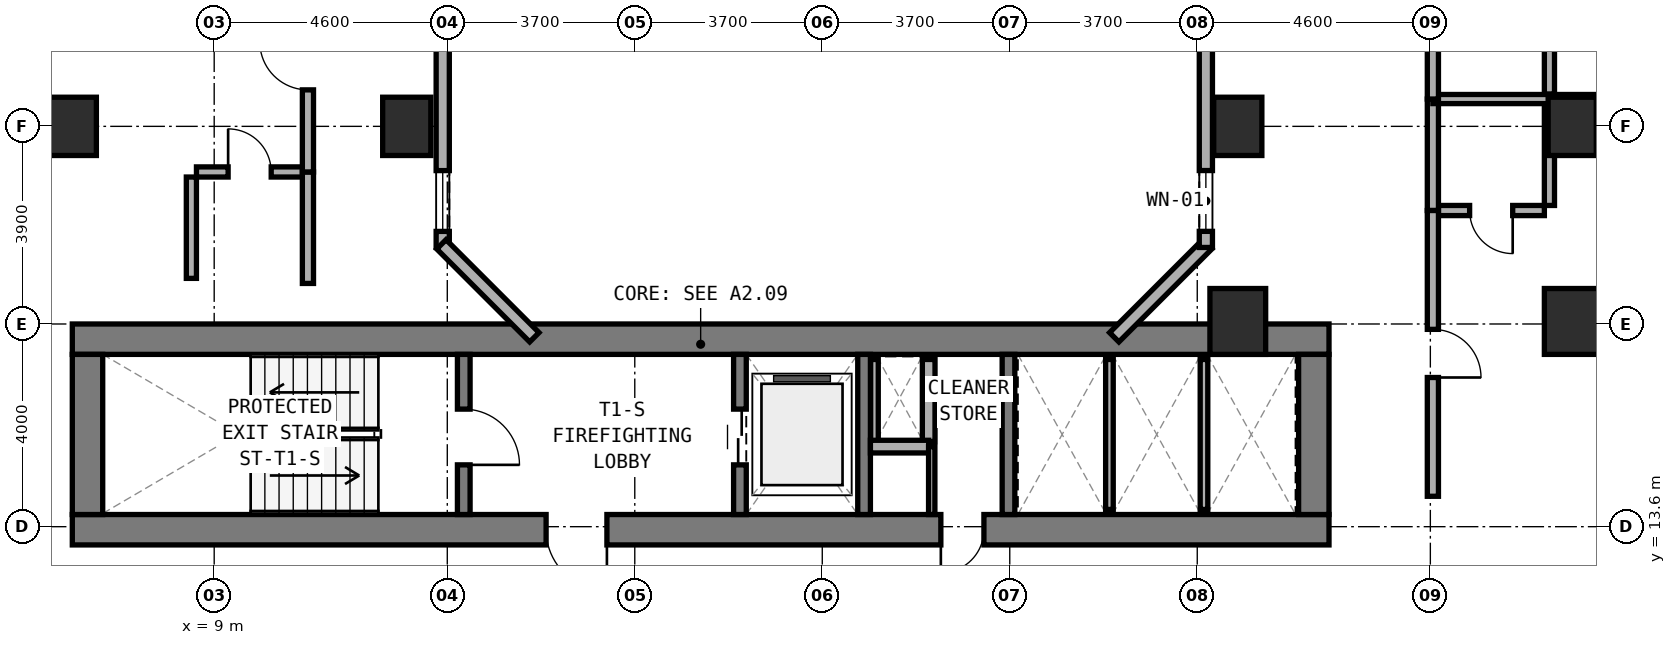
"""IFC4 building model, lengths in metres.
Left out: names, types, materials, properties, quantities, classifications, styles, units other than length and angle.
Written with IfcOpenShell. Run it as: python <this file> out.ifc"""

import sys

from ifc_helpers import new_model, si_unit, direction, frame, frame_2d, origin, origin_2d, place, context, subcontext, project, spatial, rectangle, extrude, element, fill, save


model = new_model("IFC4")
c1 = context("Model", 3, precision=1e-05, world=origin(), true_north=direction((0.0, 1.0)))
c2 = subcontext(c1, "Body", "Model", "MODEL_VIEW")
j1 = project(units=[si_unit("LENGTHUNIT", "METRE"), si_unit("PLANEANGLEUNIT", "RADIAN")], contexts=[c1])
p1 = place(None, origin())
s1 = spatial("IfcSite", under=j1, at=p1, CompositionType="ELEMENT")
p2 = place(p1, origin())
s2 = spatial("IfcBuilding", under=s1, at=p2, CompositionType="ELEMENT")
p3 = place(p2, frame((0.0, 0.0, 27.5)))
s3 = spatial("IfcBuildingStorey", under=s2, at=p3, CompositionType="ELEMENT", Elevation=27.5)
p4 = place(p3, frame((6.2, 13.54, 0.0), z_axis=(0.0, 0.0, 1.0), x_axis=(1.0, 0.0, 0.0)))
e1 = element("IfcWall", 1, at=p4, inside=s3, PredefinedType="SHEAR", context=c2, shape_type="SweptSolid", body=[
    extrude(rectangle(XDim=24.8, YDim=0.6, at=frame_2d((12.4, 0.0))), origin(), (0.0, 0.0, 1.0), 3.5),
])
p5 = place(p4, frame((9.35, 0.0, 0.0)))
e2 = element("IfcOpeningElement", 2, at=p5, cuts=e1, PredefinedType="OPENING", context=c2, shape_type="SweptSolid", body=[
    extrude(rectangle(XDim=1.2, YDim=2.15, at=frame_2d((0.6, 1.075))), frame((0.0, 0.31, 0.0), z_axis=(0.0, -1.0, 0.0), x_axis=(1.0, 0.0, 0.0)), (0.0, 0.0, 1.0), 0.62),
])
p6 = place(p4, frame((17.14, 0.0, 0.0)))
e3 = element("IfcOpeningElement", 3, at=p6, cuts=e1, PredefinedType="OPENING", context=c2, shape_type="SweptSolid", body=[
    extrude(rectangle(XDim=0.85, YDim=2.1, at=frame_2d((0.425, 1.05))), frame((0.0, 0.31, 0.0), z_axis=(0.0, -1.0, 0.0), x_axis=(1.0, 0.0, 0.0)), (0.0, 0.0, 1.0), 0.62),
])
p7 = place(p3, frame((6.2, 17.3, 0.0), z_axis=(0.0, 0.0, 1.0), x_axis=(1.0, 0.0, 0.0)))
e4 = element("IfcWall", 4, at=p7, inside=s3, PredefinedType="SHEAR", context=c2, shape_type="SweptSolid", body=[
    extrude(rectangle(XDim=24.8, YDim=0.6, at=frame_2d((12.4, 0.0))), origin(), (0.0, 0.0, 1.0), 3.5),
])
for number, where, z_axis, x_axis in (
    (5, (6.5, 13.84, 0.0), (0.0, 0.0, 1.0), (0.0, 1.0, 0.0)),
    (6, (30.7, 13.84, 0.0), (0.0, 0.0, 1.0), (0.0, 1.0, 0.0)),
):
    element("IfcWall", number, at=place(p3, frame(where, z_axis=z_axis, x_axis=x_axis)), inside=s3, PredefinedType="SHEAR", context=c2, shape_type="SweptSolid", body=[
        extrude(rectangle(XDim=3.16, YDim=0.6, at=frame_2d((1.58, 0.0))), origin(), (0.0, 0.0, 1.0), 3.5),
    ])
p8 = place(p3, frame((13.925, 13.84, 0.0), z_axis=(0.0, 0.0, 1.0), x_axis=(0.0, 1.0, 0.0)))
e7 = element("IfcWall", 7, at=p8, inside=s3, PredefinedType="STANDARD", context=c2, shape_type="SweptSolid", body=[
    extrude(rectangle(XDim=3.16, YDim=0.25, at=frame_2d((1.58, 0.0))), origin(), (0.0, 0.0, 1.0), 3.22),
])
p9 = place(p8, frame((0.98, 0.0, 0.0)))
e8 = element("IfcOpeningElement", 8, at=p9, cuts=e7, PredefinedType="OPENING", context=c2, shape_type="SweptSolid", body=[
    extrude(rectangle(XDim=1.1, YDim=2.15, at=frame_2d((0.55, 1.075))), frame((0.0, 0.135, 0.0), z_axis=(0.0, -1.0, 0.0), x_axis=(1.0, 0.0, 0.0)), (0.0, 0.0, 1.0), 0.27),
])
p10 = place(p3, frame((19.375, 13.84, 0.0), z_axis=(0.0, 0.0, 1.0), x_axis=(0.0, 1.0, 0.0)))
e9 = element("IfcWall", 9, at=p10, inside=s3, PredefinedType="STANDARD", context=c2, shape_type="SweptSolid", body=[
    extrude(rectangle(XDim=3.16, YDim=0.25, at=frame_2d((1.58, 0.0))), origin(), (0.0, 0.0, 1.0), 3.22),
])
p11 = place(p10, frame((0.98, 0.0, 0.0)))
e10 = element("IfcOpeningElement", 10, at=p11, cuts=e9, PredefinedType="OPENING", context=c2, shape_type="SweptSolid", body=[
    extrude(rectangle(XDim=1.1, YDim=2.15, at=frame_2d((0.55, 1.075))), frame((0.0, 0.135, 0.0), z_axis=(0.0, -1.0, 0.0), x_axis=(1.0, 0.0, 0.0)), (0.0, 0.0, 1.0), 0.27),
])
for number, where, z_axis, x_axis in (
    (11, (21.825, 13.84, 0.0), (0.0, 0.0, 1.0), (0.0, 1.0, 0.0)),
    (12, (24.675, 13.84, 0.0), (0.0, 0.0, 1.0), (0.0, 1.0, 0.0)),
):
    element("IfcWall", number, at=place(p3, frame(where, z_axis=z_axis, x_axis=x_axis)), inside=s3, PredefinedType="STANDARD", context=c2, shape_type="SweptSolid", body=[
        extrude(rectangle(XDim=3.16, YDim=0.25, at=frame_2d((1.58, 0.0))), origin(), (0.0, 0.0, 1.0), 3.22),
    ])
for number, where, z_axis, x_axis in (
    (13, (6.2, 21.5, 0.0), (0.0, 0.0, 1.0), (1.0, 0.0, 0.0)),
    (14, (35.8, 21.5, 0.0), (0.0, 0.0, 1.0), (1.0, 0.0, 0.0)),
):
    element("IfcColumn", number, at=place(p3, frame(where, z_axis=z_axis, x_axis=x_axis)), inside=s3, PredefinedType="COLUMN", context=c2, shape_type="SweptSolid", body=[
        extrude(rectangle(XDim=0.95, YDim=1.15, at=origin_2d()), origin(), (0.0, 0.0, 1.0), 3.5),
    ])
p12 = place(p3, frame((35.8, 17.65, 0.0), z_axis=(0.0, 0.0, 1.0), x_axis=(1.0, 0.0, 0.0)))
e15 = element("IfcColumn", 15, at=p12, inside=s3, PredefinedType="COLUMN", context=c2, shape_type="SweptSolid", body=[
    extrude(rectangle(XDim=1.1, YDim=1.3, at=origin_2d()), origin(), (0.0, 0.0, 1.0), 3.5),
])
p13 = place(p3, frame((12.8, 21.5, 0.0), z_axis=(0.0, 0.0, 1.0), x_axis=(1.0, 0.0, 0.0)))
e16 = element("IfcColumn", 16, at=p13, inside=s3, PredefinedType="COLUMN", context=c2, shape_type="SweptSolid", body=[
    extrude(rectangle(XDim=0.95, YDim=1.15, at=origin_2d()), origin(), (0.0, 0.0, 1.0), 3.5),
])
p14 = place(p3, frame((29.2, 17.65, 0.0), z_axis=(0.0, 0.0, 1.0), x_axis=(1.0, 0.0, 0.0)))
e17 = element("IfcColumn", 17, at=p14, inside=s3, PredefinedType="COLUMN", context=c2, shape_type="SweptSolid", body=[
    extrude(rectangle(XDim=1.1, YDim=1.3, at=origin_2d()), origin(), (0.0, 0.0, 1.0), 3.5),
])
p15 = place(p3, frame((29.2, 21.5, 0.0), z_axis=(0.0, 0.0, 1.0), x_axis=(1.0, 0.0, 0.0)))
e18 = element("IfcColumn", 18, at=p15, inside=s3, PredefinedType="COLUMN", context=c2, shape_type="SweptSolid", body=[
    extrude(rectangle(XDim=0.95, YDim=1.15, at=origin_2d()), origin(), (0.0, 0.0, 1.0), 3.5),
])
p16 = place(p3, frame((26.762, 17.338, 0.0), z_axis=(0.0, 0.0, 1.0), x_axis=(0.707059717605, 0.707153841636, 0.0)))
e19 = element("IfcWall", 19, at=p16, inside=s3, PredefinedType="STANDARD", context=c2, shape_type="SweptSolid", body=[
    extrude(rectangle(XDim=2.594, YDim=0.26, at=frame_2d((1.297, 0.0))), origin(), (0.0, 0.0, 1.0), 3.22),
])
p17 = place(p3, frame((28.57, 19.11, 0.0), z_axis=(0.0, 0.0, 1.0), x_axis=(0.0, 1.0, 0.0)))
e20 = element("IfcWall", 20, at=p17, inside=s3, PredefinedType="STANDARD", context=c2, shape_type="SweptSolid", body=[
    extrude(rectangle(XDim=11.78, YDim=0.26, at=frame_2d((5.89, 0.0))), origin(), (0.0, 0.0, 1.0), 3.22),
])
p18 = place(p17, frame((0.318, 0.0, 0.85)))
e21 = element("IfcOpeningElement", 21, at=p18, cuts=e20, PredefinedType="OPENING", context=c2, shape_type="SweptSolid", body=[
    extrude(rectangle(XDim=1.2, YDim=1.5, at=frame_2d((0.6, 0.75))), frame((0.0, 0.14, 0.0), z_axis=(0.0, -1.0, 0.0), x_axis=(1.0, 0.0, 0.0)), (0.0, 0.0, 1.0), 0.28),
])
p19 = place(p17, frame((4.99, 0.0, 0.85)))
e22 = element("IfcOpeningElement", 22, at=p19, cuts=e20, PredefinedType="OPENING", context=c2, shape_type="SweptSolid", body=[
    extrude(rectangle(XDim=1.8, YDim=1.5, at=frame_2d((0.9, 0.75))), frame((0.0, 0.14, 0.0), z_axis=(0.0, -1.0, 0.0), x_axis=(1.0, 0.0, 0.0)), (0.0, 0.0, 1.0), 0.28),
])
p20 = place(p17, frame((10.263, 0.0, 0.85)))
e23 = element("IfcOpeningElement", 23, at=p20, cuts=e20, PredefinedType="OPENING", context=c2, shape_type="SweptSolid", body=[
    extrude(rectangle(XDim=1.2, YDim=1.5, at=frame_2d((0.6, 0.75))), frame((0.0, 0.14, 0.0), z_axis=(0.0, -1.0, 0.0), x_axis=(1.0, 0.0, 0.0)), (0.0, 0.0, 1.0), 0.28),
])
p21 = place(p3, frame((13.51, 30.89, 0.0), z_axis=(0.0, 0.0, 1.0), x_axis=(0.0, -1.0, 0.0)))
e24 = element("IfcWall", 24, at=p21, inside=s3, PredefinedType="STANDARD", context=c2, shape_type="SweptSolid", body=[
    extrude(rectangle(XDim=11.78, YDim=0.26, at=frame_2d((5.89, 0.0))), origin(), (0.0, 0.0, 1.0), 3.22),
])
p22 = place(p21, frame((0.318, 0.0, 0.85)))
e25 = element("IfcOpeningElement", 25, at=p22, cuts=e24, PredefinedType="OPENING", context=c2, shape_type="SweptSolid", body=[
    extrude(rectangle(XDim=1.2, YDim=1.5, at=frame_2d((0.6, 0.75))), frame((0.0, 0.14, 0.0), z_axis=(0.0, -1.0, 0.0), x_axis=(1.0, 0.0, 0.0)), (0.0, 0.0, 1.0), 0.28),
])
p23 = place(p21, frame((4.99, 0.0, 0.85)))
e26 = element("IfcOpeningElement", 26, at=p23, cuts=e24, PredefinedType="OPENING", context=c2, shape_type="SweptSolid", body=[
    extrude(rectangle(XDim=1.8, YDim=1.5, at=frame_2d((0.9, 0.75))), frame((0.0, 0.14, 0.0), z_axis=(0.0, -1.0, 0.0), x_axis=(1.0, 0.0, 0.0)), (0.0, 0.0, 1.0), 0.28),
])
p24 = place(p21, frame((10.263, 0.0, 0.85)))
e27 = element("IfcOpeningElement", 27, at=p24, cuts=e24, PredefinedType="OPENING", context=c2, shape_type="SweptSolid", body=[
    extrude(rectangle(XDim=1.2, YDim=1.5, at=frame_2d((0.6, 0.75))), frame((0.0, 0.14, 0.0), z_axis=(0.0, -1.0, 0.0), x_axis=(1.0, 0.0, 0.0)), (0.0, 0.0, 1.0), 0.28),
])
p25 = place(p3, frame((13.484, 19.172, 0.0), z_axis=(0.0, 0.0, 1.0), x_axis=(0.707106781187, -0.707106781187, 0.0)))
e28 = element("IfcWall", 28, at=p25, inside=s3, PredefinedType="STANDARD", context=c2, shape_type="SweptSolid", body=[
    extrude(rectangle(XDim=2.594, YDim=0.26, at=frame_2d((1.297, 0.0))), origin(), (0.0, 0.0, 1.0), 3.22),
])
p26 = place(p3, frame((22.03, 15.28, 0.0), z_axis=(0.0, 0.0, 1.0), x_axis=(0.0, 1.0, 0.0)))
e29 = element("IfcWall", 29, at=p26, inside=s3, PredefinedType="PARTITIONING", context=c2, shape_type="SweptSolid", body=[
    extrude(rectangle(XDim=1.62, YDim=0.15, at=frame_2d((0.81, 0.0))), origin(), (0.0, 0.0, 1.0), 3.22),
])
p27 = place(p3, frame((23.1, 15.28, 0.0), z_axis=(0.0, 0.0, 1.0), x_axis=(0.0, 1.0, 0.0)))
e30 = element("IfcWall", 30, at=p27, inside=s3, PredefinedType="SOLIDWALL", context=c2, shape_type="SweptSolid", body=[
    extrude(rectangle(XDim=1.62, YDim=0.25, at=frame_2d((0.81, 0.0))), origin(), (0.0, 0.0, 1.0), 3.22),
])
p28 = place(p3, frame((21.95, 15.18, 0.0), z_axis=(0.0, 0.0, 1.0), x_axis=(1.0, 0.0, 0.0)))
e31 = element("IfcWall", 31, at=p28, inside=s3, PredefinedType="SOLIDWALL", context=c2, shape_type="SweptSolid", body=[
    extrude(rectangle(XDim=1.15, YDim=0.25, at=frame_2d((0.575, 0.0))), origin(), (0.0, 0.0, 1.0), 3.22),
])
p29 = place(p3, frame((23.16, 13.84, 0.0), z_axis=(0.0, 0.0, 1.0), x_axis=(0.0, 1.0, 0.0)))
e32 = element("IfcWall", 32, at=p29, inside=s3, PredefinedType="PARTITIONING", context=c2, shape_type="SweptSolid", body=[
    extrude(rectangle(XDim=1.34, YDim=0.125, at=frame_2d((0.67, 0.0))), origin(), (0.0, 0.0, 1.0), 3.22),
])
p30 = place(p3, frame((26.667, 13.94, 0.0), z_axis=(0.0, 0.0, 1.0), x_axis=(0.0, 1.0, 0.0)))
e33 = element("IfcWall", 33, at=p30, inside=s3, PredefinedType="PARTITIONING", context=c2, shape_type="SweptSolid", body=[
    extrude(rectangle(XDim=2.96, YDim=0.15, at=frame_2d((1.48, 0.0))), origin(), (0.0, 0.0, 1.0), 3.22),
])
p31 = place(p3, frame((28.533, 13.94, 0.0), z_axis=(0.0, 0.0, 1.0), x_axis=(0.0, 1.0, 0.0)))
e34 = element("IfcWall", 34, at=p31, inside=s3, PredefinedType="PARTITIONING", context=c2, shape_type="SweptSolid", body=[
    extrude(rectangle(XDim=2.96, YDim=0.15, at=frame_2d((1.48, 0.0))), origin(), (0.0, 0.0, 1.0), 2.395),
])
p32 = place(p3, frame((8.65, 20.6, 0.0), z_axis=(0.0, 0.0, 1.0), x_axis=(1.0, 0.0, 0.0)))
e35 = element("IfcWall", 35, at=p32, inside=s3, PredefinedType="PLUMBINGWALL", context=c2, shape_type="SweptSolid", body=[
    extrude(rectangle(XDim=2.1, YDim=0.2, at=frame_2d((1.05, 0.0))), origin(), (0.0, 0.0, 1.0), 3.22),
])
p33 = place(p32, frame((0.625, 0.0, 0.0)))
e36 = element("IfcOpeningElement", 36, at=p33, cuts=e35, PredefinedType="OPENING", context=c2, shape_type="SweptSolid", body=[
    extrude(rectangle(XDim=0.85, YDim=2.1, at=frame_2d((0.425, 1.05))), frame((0.0, 0.11, 0.0), z_axis=(0.0, -1.0, 0.0), x_axis=(1.0, 0.0, 0.0)), (0.0, 0.0, 1.0), 0.22),
])
p34 = place(p3, frame((8.55, 18.5, 0.0), z_axis=(0.0, 0.0, 1.0), x_axis=(0.0, 1.0, 0.0)))
e37 = element("IfcWall", 37, at=p34, inside=s3, PredefinedType="PLUMBINGWALL", context=c2, shape_type="SweptSolid", body=[
    extrude(rectangle(XDim=2.0, YDim=0.2, at=frame_2d((1.0, 0.0))), origin(), (0.0, 0.0, 1.0), 3.22),
])
p35 = place(p3, frame((10.85, 18.4, 0.0), z_axis=(0.0, 0.0, 1.0), x_axis=(0.0, 1.0, 0.0)))
e38 = element("IfcWall", 38, at=p35, inside=s3, PredefinedType="SOLIDWALL", context=c2, shape_type="SweptSolid", body=[
    extrude(rectangle(XDim=2.2, YDim=0.22, at=frame_2d((1.1, 0.0))), origin(), (0.0, 0.0, 1.0), 3.22),
])
p36 = place(p3, frame((10.85, 20.6, 0.0), z_axis=(0.0, 0.0, 1.0), x_axis=(0.0, 1.0, 0.0)))
e39 = element("IfcWall", 39, at=p36, inside=s3, PredefinedType="SOLIDWALL", context=c2, shape_type="SweptSolid", body=[
    extrude(rectangle(XDim=3.63, YDim=0.22, at=frame_2d((1.815, 0.0))), origin(), (0.0, 0.0, 1.0), 2.395),
])
p37 = place(p36, frame((1.62, 0.0, 0.0)))
e40 = element("IfcOpeningElement", 40, at=p37, cuts=e39, PredefinedType="OPENING", context=c2, shape_type="SweptSolid", body=[
    extrude(rectangle(XDim=0.95, YDim=2.1, at=frame_2d((0.475, 1.05))), frame((0.0, 0.12, 0.0), z_axis=(0.0, -1.0, 0.0), x_axis=(1.0, 0.0, 0.0)), (0.0, 0.0, 1.0), 0.24),
])
p38 = place(p3, frame((33.15, 19.839, 0.0), z_axis=(0.0, 0.0, 1.0), x_axis=(1.0, 0.0, 0.0)))
e41 = element("IfcWall", 41, at=p38, inside=s3, PredefinedType="PLUMBINGWALL", context=c2, shape_type="SweptSolid", body=[
    extrude(rectangle(XDim=2.1, YDim=0.2, at=frame_2d((1.05, 0.0))), origin(), (0.0, 0.0, 1.0), 3.22),
])
p39 = place(p38, frame((0.625, 0.0, 0.0)))
e42 = element("IfcOpeningElement", 42, at=p39, cuts=e41, PredefinedType="OPENING", context=c2, shape_type="SweptSolid", body=[
    extrude(rectangle(XDim=0.85, YDim=2.1, at=frame_2d((0.425, 1.05))), frame((0.0, 0.11, 0.0), z_axis=(0.0, -1.0, 0.0), x_axis=(1.0, 0.0, 0.0)), (0.0, 0.0, 1.0), 0.22),
])
p40 = place(p3, frame((35.35, 19.939, 0.0), z_axis=(0.0, 0.0, 1.0), x_axis=(0.0, 1.0, 0.0)))
e43 = element("IfcWall", 43, at=p40, inside=s3, PredefinedType="PLUMBINGWALL", context=c2, shape_type="SweptSolid", body=[
    extrude(rectangle(XDim=2.0, YDim=0.2, at=frame_2d((1.0, 0.0))), origin(), (0.0, 0.0, 1.0), 2.395),
])
p41 = place(p3, frame((33.05, 19.839, 0.0), z_axis=(0.0, 0.0, 1.0), x_axis=(0.0, 1.0, 0.0)))
e44 = element("IfcWall", 44, at=p41, inside=s3, PredefinedType="SOLIDWALL", context=c2, shape_type="SweptSolid", body=[
    extrude(rectangle(XDim=2.2, YDim=0.22, at=frame_2d((1.1, 0.0))), origin(), (0.0, 0.0, 1.0), 2.395),
])
p42 = place(p3, frame((33.05, 14.2, 0.0), z_axis=(0.0, 0.0, 1.0), x_axis=(0.0, 1.0, 0.0)))
e45 = element("IfcWall", 45, at=p42, inside=s3, PredefinedType="SOLIDWALL", context=c2, shape_type="SweptSolid", body=[
    extrude(rectangle(XDim=5.639, YDim=0.22, at=frame_2d((2.82, 0.0))), origin(), (0.0, 0.0, 1.0), 2.395),
])
p43 = place(p42, frame((2.344, 0.0, 0.0)))
e46 = element("IfcOpeningElement", 46, at=p43, cuts=e45, PredefinedType="OPENING", context=c2, shape_type="SweptSolid", body=[
    extrude(rectangle(XDim=0.95, YDim=2.1, at=frame_2d((0.475, 1.05))), frame((0.0, 0.12, 0.0), z_axis=(0.0, -1.0, 0.0), x_axis=(1.0, 0.0, 0.0)), (0.0, 0.0, 1.0), 0.24),
])
p44 = place(p3, frame((33.05, 22.039, 0.0), z_axis=(0.0, 0.0, 1.0), x_axis=(1.0, 0.0, 0.0)))
e47 = element("IfcWall", 47, at=p44, inside=s3, PredefinedType="SOLIDWALL", context=c2, shape_type="SweptSolid", body=[
    extrude(rectangle(XDim=8.89, YDim=0.18, at=frame_2d((4.445, 0.0))), origin(), (0.0, 0.0, 1.0), 2.745),
])
p45 = place(p3, frame((35.35, 22.139, 0.0), z_axis=(0.0, 0.0, 1.0), x_axis=(0.0, 1.0, 0.0)))
e48 = element("IfcWall", 48, at=p45, inside=s3, PredefinedType="PLUMBINGWALL", context=c2, shape_type="SweptSolid", body=[
    extrude(rectangle(XDim=2.0, YDim=0.2, at=frame_2d((1.0, 0.0))), origin(), (0.0, 0.0, 1.0), 3.22),
])
p46 = place(p3, frame((33.05, 22.039, 0.0), z_axis=(0.0, 0.0, 1.0), x_axis=(0.0, 1.0, 0.0)))
e49 = element("IfcWall", 49, at=p46, inside=s3, PredefinedType="SOLIDWALL", context=c2, shape_type="SweptSolid", body=[
    extrude(rectangle(XDim=2.2, YDim=0.22, at=frame_2d((1.1, 0.0))), origin(), (0.0, 0.0, 1.0), 3.22),
])
p47 = place(p18, origin())
e50 = element("IfcWindow", 50, at=p47, inside=s3, PartitioningType="SINGLE_PANEL", PredefinedType="WINDOW", context=c2, shape_type="SweptSolid", body=[
    extrude(rectangle(XDim=1.2, YDim=1.5, at=frame_2d((0.6, 0.75))), frame((0.0, 0.03, 0.0), z_axis=(0.0, -1.0, 0.0), x_axis=(1.0, 0.0, 0.0)), (0.0, 0.0, 1.0), 0.06),
])
fill(e21, e50)
p48 = place(p24, origin())
e51 = element("IfcWindow", 51, at=p48, inside=s3, PartitioningType="SINGLE_PANEL", PredefinedType="WINDOW", context=c2, shape_type="SweptSolid", body=[
    extrude(rectangle(XDim=1.2, YDim=1.5, at=frame_2d((0.6, 0.75))), frame((0.0, 0.03, 0.0), z_axis=(0.0, -1.0, 0.0), x_axis=(1.0, 0.0, 0.0)), (0.0, 0.0, 1.0), 0.06),
])
fill(e27, e51)
p49 = place(p9, frame((1.1, 0.0, 0.0), z_axis=(0.0, 0.0, 1.0), x_axis=(-1.0, 0.0, 0.0)))
e52 = element("IfcDoor", 52, at=p49, inside=s3, OperationType="SINGLE_SWING_RIGHT", PredefinedType="DOOR", context=c2, shape_type="SweptSolid", body=[
    extrude(rectangle(XDim=1.1, YDim=2.15, at=frame_2d((0.55, 1.075))), frame((0.0, 0.025, 0.0), z_axis=(0.0, -1.0, 0.0), x_axis=(1.0, 0.0, 0.0)), (0.0, 0.0, 1.0), 0.05),
])
fill(e8, e52)
p50 = place(p5, frame((1.2, 0.0, 0.0), z_axis=(0.0, 0.0, 1.0), x_axis=(-1.0, 0.0, 0.0)))
e53 = element("IfcDoor", 53, at=p50, inside=s3, OperationType="SINGLE_SWING_LEFT", PredefinedType="DOOR", context=c2, shape_type="SweptSolid", body=[
    extrude(rectangle(XDim=1.2, YDim=2.15, at=frame_2d((0.6, 1.075))), frame((0.0, 0.025, 0.0), z_axis=(0.0, -1.0, 0.0), x_axis=(1.0, 0.0, 0.0)), (0.0, 0.0, 1.0), 0.05),
])
fill(e2, e53)
p51 = place(p11, origin())
e54 = element("IfcDoor", 54, at=p51, inside=s3, OperationType="DOUBLE_DOOR_SLIDING", PredefinedType="DOOR", context=c2, shape_type="SweptSolid", body=[
    extrude(rectangle(XDim=1.1, YDim=2.15, at=frame_2d((0.55, 1.075))), frame((0.0, 0.025, 0.0), z_axis=(0.0, -1.0, 0.0), x_axis=(1.0, 0.0, 0.0)), (0.0, 0.0, 1.0), 0.05),
])
fill(e10, e54)
p52 = place(p6, frame((0.85, 0.0, 0.0), z_axis=(0.0, 0.0, 1.0), x_axis=(-1.0, 0.0, 0.0)))
e55 = element("IfcDoor", 55, at=p52, inside=s3, OperationType="SINGLE_SWING_RIGHT", PredefinedType="DOOR", context=c2, shape_type="SweptSolid", body=[
    extrude(rectangle(XDim=0.85, YDim=2.1, at=frame_2d((0.425, 1.05))), frame((0.0, 0.025, 0.0), z_axis=(0.0, -1.0, 0.0), x_axis=(1.0, 0.0, 0.0)), (0.0, 0.0, 1.0), 0.05),
])
fill(e3, e55)
p53 = place(p33, origin())
e56 = element("IfcDoor", 56, at=p53, inside=s3, OperationType="SINGLE_SWING_LEFT", PredefinedType="DOOR", context=c2, shape_type="SweptSolid", body=[
    extrude(rectangle(XDim=0.85, YDim=2.1, at=frame_2d((0.425, 1.05))), frame((0.0, 0.025, 0.0), z_axis=(0.0, -1.0, 0.0), x_axis=(1.0, 0.0, 0.0)), (0.0, 0.0, 1.0), 0.05),
])
fill(e36, e56)
p54 = place(p37, origin())
e57 = element("IfcDoor", 57, at=p54, inside=s3, OperationType="SINGLE_SWING_RIGHT", PredefinedType="DOOR", context=c2, shape_type="SweptSolid", body=[
    extrude(rectangle(XDim=0.95, YDim=2.1, at=frame_2d((0.475, 1.05))), frame((0.0, 0.025, 0.0), z_axis=(0.0, -1.0, 0.0), x_axis=(1.0, 0.0, 0.0)), (0.0, 0.0, 1.0), 0.05),
])
fill(e40, e57)
p55 = place(p39, frame((0.85, 0.0, 0.0), z_axis=(0.0, 0.0, 1.0), x_axis=(-1.0, 0.0, 0.0)))
e58 = element("IfcDoor", 58, at=p55, inside=s3, OperationType="SINGLE_SWING_LEFT", PredefinedType="DOOR", context=c2, shape_type="SweptSolid", body=[
    extrude(rectangle(XDim=0.85, YDim=2.1, at=frame_2d((0.425, 1.05))), frame((0.0, 0.025, 0.0), z_axis=(0.0, -1.0, 0.0), x_axis=(1.0, 0.0, 0.0)), (0.0, 0.0, 1.0), 0.05),
])
fill(e42, e58)
p56 = place(p43, frame((0.95, 0.0, 0.0), z_axis=(0.0, 0.0, 1.0), x_axis=(-1.0, 0.0, 0.0)))
e59 = element("IfcDoor", 59, at=p56, inside=s3, OperationType="SINGLE_SWING_RIGHT", PredefinedType="DOOR", context=c2, shape_type="SweptSolid", body=[
    extrude(rectangle(XDim=0.95, YDim=2.1, at=frame_2d((0.475, 1.05))), frame((0.0, 0.025, 0.0), z_axis=(0.0, -1.0, 0.0), x_axis=(1.0, 0.0, 0.0)), (0.0, 0.0, 1.0), 0.05),
])
fill(e46, e59)
save(model, sys.argv[1])
